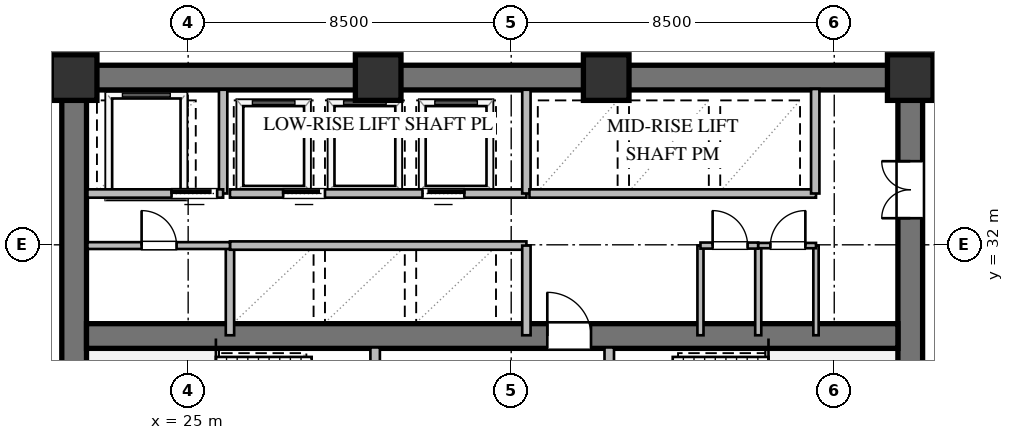
"""IFC4 building model, lengths in metres.
Left out: names, types, materials, properties, quantities, classifications, styles, units other than length and angle.
Written with IfcOpenShell. Run it as: python <this file> out.ifc"""

import sys

from ifc_helpers import new_model, si_unit, direction, frame, frame_2d, origin, origin_2d, place, context, subcontext, project, spatial, rectangle, extrude, element, fill, save


model = new_model("IFC4")
c1 = context("Model", 3, precision=1e-05, world=origin(), true_north=direction((0.0, 1.0)))
c2 = subcontext(c1, "Body", "Model", "MODEL_VIEW")
j1 = project(units=[si_unit("LENGTHUNIT", "METRE"), si_unit("PLANEANGLEUNIT", "RADIAN")], contexts=[c1])
p1 = place(None, origin())
s1 = spatial("IfcSite", under=j1, at=p1, CompositionType="ELEMENT")
p2 = place(p1, origin())
s2 = spatial("IfcBuilding", under=s1, at=p2, CompositionType="ELEMENT")
p3 = place(p2, frame((0.0, 0.0, 49.2)))
s3 = spatial("IfcBuildingStorey", under=s2, at=p3, CompositionType="ELEMENT", Elevation=49.2)
p4 = place(p3, frame((21.675, 36.4, 0.0), z_axis=(0.0, 0.0, 1.0), x_axis=(1.0, 0.0, 0.0)))
e1 = element("IfcWall", 1, at=p4, inside=s3, PredefinedType="SHEAR", context=c2, shape_type="SweptSolid", body=[
    extrude(rectangle(XDim=22.65, YDim=0.65, at=frame_2d((11.325, 0.0))), origin(), (0.0, 0.0, 1.0), 3.36),
])
p5 = place(p3, frame((22.0, 23.925, 0.0), z_axis=(0.0, 0.0, 1.0), x_axis=(0.0, 1.0, 0.0)))
e2 = element("IfcWall", 2, at=p5, inside=s3, PredefinedType="SHEAR", context=c2, shape_type="SweptSolid", body=[
    extrude(rectangle(XDim=12.15, YDim=0.65, at=frame_2d((6.075, 0.0))), origin(), (0.0, 0.0, 1.0), 3.36),
])
p6 = place(p3, frame((44.0, 23.925, 0.0), z_axis=(0.0, 0.0, 1.0), x_axis=(0.0, 1.0, 0.0)))
e3 = element("IfcWall", 3, at=p6, inside=s3, PredefinedType="SHEAR", context=c2, shape_type="SweptSolid", body=[
    extrude(rectangle(XDim=12.15, YDim=0.65, at=frame_2d((6.075, 0.0))), origin(), (0.0, 0.0, 1.0), 3.36),
])
p7 = place(p6, frame((8.775, 0.0, 0.0)))
e4 = element("IfcOpeningElement", 4, at=p7, cuts=e3, PredefinedType="OPENING", context=c2, shape_type="SweptSolid", body=[
    extrude(rectangle(XDim=1.5, YDim=2.15, at=frame_2d((0.75, 1.075))), frame((0.0, 0.335, 0.0), z_axis=(0.0, -1.0, 0.0), x_axis=(1.0, 0.0, 0.0)), (0.0, 0.0, 1.0), 0.67),
])
p8 = place(p3, frame((22.325, 29.6, 0.0), z_axis=(0.0, 0.0, 1.0), x_axis=(1.0, 0.0, 0.0)))
e5 = element("IfcWall", 5, at=p8, inside=s3, PredefinedType="SHEAR", context=c2, shape_type="SweptSolid", body=[
    extrude(rectangle(XDim=21.35, YDim=0.65, at=frame_2d((10.675, 0.0))), origin(), (0.0, 0.0, 1.0), 3.36),
])
p9 = place(p8, frame((12.125, 0.0, 0.0)))
e6 = element("IfcOpeningElement", 6, at=p9, cuts=e5, PredefinedType="OPENING", context=c2, shape_type="SweptSolid", body=[
    extrude(rectangle(XDim=1.15, YDim=2.1, at=frame_2d((0.575, 1.05))), frame((0.0, 0.335, 0.0), z_axis=(0.0, -1.0, 0.0), x_axis=(1.0, 0.0, 0.0)), (0.0, 0.0, 1.0), 0.67),
])
for number, where, z_axis, x_axis in (
    (7, (44.0, 36.4, 0.0), (0.0, 0.0, 1.0), (1.0, 0.0, 0.0)),
    (8, (36.0, 36.4, 0.0), (0.0, 0.0, 1.0), (1.0, 0.0, 0.0)),
    (9, (30.0, 36.4, 0.0), (0.0, 0.0, 1.0), (1.0, 0.0, 0.0)),
    (10, (22.0, 36.4, 0.0), (0.0, 0.0, 1.0), (1.0, 0.0, 0.0)),
):
    element("IfcColumn", number, at=place(p3, frame(where, z_axis=z_axis, x_axis=x_axis)), inside=s3, PredefinedType="COLUMN", context=c2, shape_type="SweptSolid", body=[
        extrude(rectangle(XDim=1.2, YDim=1.2, at=origin_2d()), origin(), (0.0, 0.0, 1.0), 3.6),
    ])
p10 = place(p3, frame((29.92, 23.9, 0.0), z_axis=(0.0, 0.0, 1.0), x_axis=(0.0, 1.0, 0.0)))
e11 = element("IfcWall", 11, at=p10, inside=s3, PredefinedType="SOLIDWALL", context=c2, shape_type="SweptSolid", body=[
    extrude(rectangle(XDim=5.4, YDim=0.25, at=frame_2d((2.7, 0.0))), origin(), (0.0, 0.0, 1.0), 3.36),
])
p11 = place(p10, frame((3.421, 0.0, 0.0)))
e12 = element("IfcOpeningElement", 12, at=p11, cuts=e11, PredefinedType="OPENING", context=c2, shape_type="SweptSolid", body=[
    extrude(rectangle(XDim=1.15, YDim=2.1, at=frame_2d((0.575, 1.05))), frame((0.0, 0.135, 0.0), z_axis=(0.0, -1.0, 0.0), x_axis=(1.0, 0.0, 0.0)), (0.0, 0.0, 1.0), 0.27),
])
p12 = place(p3, frame((36.08, 23.9, 0.0), z_axis=(0.0, 0.0, 1.0), x_axis=(0.0, 1.0, 0.0)))
e13 = element("IfcWall", 13, at=p12, inside=s3, PredefinedType="SOLIDWALL", context=c2, shape_type="SweptSolid", body=[
    extrude(rectangle(XDim=5.4, YDim=0.25, at=frame_2d((2.7, 0.0))), origin(), (0.0, 0.0, 1.0), 3.36),
])
p13 = place(p12, frame((3.421, 0.0, 0.0)))
e14 = element("IfcOpeningElement", 14, at=p13, cuts=e13, PredefinedType="OPENING", context=c2, shape_type="SweptSolid", body=[
    extrude(rectangle(XDim=1.15, YDim=2.1, at=frame_2d((0.575, 1.05))), frame((0.0, 0.135, 0.0), z_axis=(0.0, -1.0, 0.0), x_axis=(1.0, 0.0, 0.0)), (0.0, 0.0, 1.0), 0.27),
])
p14 = place(p3, frame((25.92, 33.35, 0.0), z_axis=(0.0, 0.0, 1.0), x_axis=(0.0, 1.0, 0.0)))
e15 = element("IfcWall", 15, at=p14, inside=s3, PredefinedType="SOLIDWALL", context=c2, shape_type="SweptSolid", body=[
    extrude(rectangle(XDim=2.73, YDim=0.22, at=frame_2d((1.365, 0.0))), origin(), (0.0, 0.0, 1.0), 3.36),
])
p15 = place(p3, frame((22.35, 33.35, 0.0), z_axis=(0.0, 0.0, 1.0), x_axis=(1.0, 0.0, 0.0)))
e16 = element("IfcWall", 16, at=p15, inside=s3, PredefinedType="SOLIDWALL", context=c2, shape_type="SweptSolid", body=[
    extrude(rectangle(XDim=3.57, YDim=0.22, at=frame_2d((1.785, 0.0))), origin(), (0.0, 0.0, 1.0), 3.36),
])
p16 = place(p15, frame((2.213, 0.0, 0.0)))
e17 = element("IfcOpeningElement", 17, at=p16, cuts=e16, PredefinedType="OPENING", context=c2, shape_type="SweptSolid", body=[
    extrude(rectangle(XDim=1.2, YDim=2.1, at=frame_2d((0.6, 1.05))), frame((0.0, 0.12, 0.0), z_axis=(0.0, -1.0, 0.0), x_axis=(1.0, 0.0, 0.0)), (0.0, 0.0, 1.0), 0.24),
])
p17 = place(p3, frame((26.1, 29.62, 0.0), z_axis=(0.0, 0.0, 1.0), x_axis=(0.0, 1.0, 0.0)))
e18 = element("IfcWall", 18, at=p17, inside=s3, PredefinedType="SOLIDWALL", context=c2, shape_type="SweptSolid", body=[
    extrude(rectangle(XDim=2.36, YDim=0.22, at=frame_2d((1.18, 0.0))), origin(), (0.0, 0.0, 1.0), 3.36),
])
p18 = place(p3, frame((26.1, 31.98, 0.0), z_axis=(0.0, 0.0, 1.0), x_axis=(1.0, 0.0, 0.0)))
e19 = element("IfcWall", 19, at=p18, inside=s3, PredefinedType="SOLIDWALL", context=c2, shape_type="SweptSolid", body=[
    extrude(rectangle(XDim=7.8, YDim=0.22, at=frame_2d((3.9, 0.0))), origin(), (0.0, 0.0, 1.0), 3.36),
])
p19 = place(p3, frame((33.9, 29.62, 0.0), z_axis=(0.0, 0.0, 1.0), x_axis=(0.0, 1.0, 0.0)))
e20 = element("IfcWall", 20, at=p19, inside=s3, PredefinedType="SOLIDWALL", context=c2, shape_type="SweptSolid", body=[
    extrude(rectangle(XDim=2.36, YDim=0.22, at=frame_2d((1.18, 0.0))), origin(), (0.0, 0.0, 1.0), 3.36),
])
p20 = place(p3, frame((26.1, 33.35, 0.0), z_axis=(0.0, 0.0, 1.0), x_axis=(1.0, 0.0, 0.0)))
e21 = element("IfcWall", 21, at=p20, inside=s3, PredefinedType="SOLIDWALL", context=c2, shape_type="SweptSolid", body=[
    extrude(rectangle(XDim=7.8, YDim=0.22, at=frame_2d((3.9, 0.0))), origin(), (0.0, 0.0, 1.0), 3.36),
])
p21 = place(p20, frame((1.4, 0.0, 0.0)))
e22 = element("IfcOpeningElement", 22, at=p21, cuts=e21, PredefinedType="OPENING", context=c2, shape_type="SweptSolid", body=[
    extrude(rectangle(XDim=1.1, YDim=2.1, at=frame_2d((0.55, 1.05))), frame((0.0, 0.12, 0.0), z_axis=(0.0, -1.0, 0.0), x_axis=(1.0, 0.0, 0.0)), (0.0, 0.0, 1.0), 0.24),
])
p22 = place(p20, frame((5.066, 0.0, 0.0)))
e23 = element("IfcOpeningElement", 23, at=p22, cuts=e21, PredefinedType="OPENING", context=c2, shape_type="SweptSolid", body=[
    extrude(rectangle(XDim=1.1, YDim=2.1, at=frame_2d((0.55, 1.05))), frame((0.0, 0.12, 0.0), z_axis=(0.0, -1.0, 0.0), x_axis=(1.0, 0.0, 0.0)), (0.0, 0.0, 1.0), 0.24),
])
p23 = place(p3, frame((33.9, 33.35, 0.0), z_axis=(0.0, 0.0, 1.0), x_axis=(0.0, 1.0, 0.0)))
e24 = element("IfcWall", 24, at=p23, inside=s3, PredefinedType="SOLIDWALL", context=c2, shape_type="SweptSolid", body=[
    extrude(rectangle(XDim=2.73, YDim=0.22, at=frame_2d((1.365, 0.0))), origin(), (0.0, 0.0, 1.0), 3.36),
])
p24 = place(p3, frame((33.98, 33.35, 0.0), z_axis=(0.0, 0.0, 1.0), x_axis=(1.0, 0.0, 0.0)))
e25 = element("IfcWall", 25, at=p24, inside=s3, PredefinedType="SOLIDWALL", context=c2, shape_type="SweptSolid", body=[
    extrude(rectangle(XDim=7.54, YDim=0.22, at=frame_2d((3.77, 0.0))), origin(), (0.0, 0.0, 1.0), 3.36),
])
p25 = place(p3, frame((41.5, 33.35, 0.0), z_axis=(0.0, 0.0, 1.0), x_axis=(0.0, 1.0, 0.0)))
e26 = element("IfcWall", 26, at=p25, inside=s3, PredefinedType="SOLIDWALL", context=c2, shape_type="SweptSolid", body=[
    extrude(rectangle(XDim=2.75, YDim=0.22, at=frame_2d((1.375, 0.0))), origin(), (0.0, 0.0, 1.0), 3.36),
])
p26 = place(p3, frame((22.35, 31.98, 0.0), z_axis=(0.0, 0.0, 1.0), x_axis=(1.0, 0.0, 0.0)))
e27 = element("IfcWall", 27, at=p26, inside=s3, PredefinedType="PARTITIONING", context=c2, shape_type="SweptSolid", body=[
    extrude(rectangle(XDim=3.75, YDim=0.18, at=frame_2d((1.875, 0.0))), origin(), (0.0, 0.0, 1.0), 3.36),
])
p27 = place(p26, frame((1.425, 0.0, 0.0)))
e28 = element("IfcOpeningElement", 28, at=p27, cuts=e27, PredefinedType="OPENING", context=c2, shape_type="SweptSolid", body=[
    extrude(rectangle(XDim=0.92, YDim=2.1, at=frame_2d((0.46, 1.05))), frame((0.0, 0.1, 0.0), z_axis=(0.0, -1.0, 0.0), x_axis=(1.0, 0.0, 0.0)), (0.0, 0.0, 1.0), 0.2),
])
for number, where, z_axis, x_axis in (
    (29, (38.48, 29.62, 0.0), (0.0, 0.0, 1.0), (0.0, 1.0, 0.0)),
    (30, (40.0, 29.62, 0.0), (0.0, 0.0, 1.0), (0.0, 1.0, 0.0)),
):
    element("IfcWall", number, at=place(p3, frame(where, z_axis=z_axis, x_axis=x_axis)), inside=s3, PredefinedType="PLUMBINGWALL", context=c2, shape_type="SweptSolid", body=[
        extrude(rectangle(XDim=2.36, YDim=0.16, at=frame_2d((1.18, 0.0))), origin(), (0.0, 0.0, 1.0), 3.36),
    ])
p28 = place(p3, frame((41.52, 29.62, 0.0), z_axis=(0.0, 0.0, 1.0), x_axis=(0.0, 1.0, 0.0)))
e31 = element("IfcWall", 31, at=p28, inside=s3, PredefinedType="PARTITIONING", context=c2, shape_type="SweptSolid", body=[
    extrude(rectangle(XDim=2.36, YDim=0.14, at=frame_2d((1.18, 0.0))), origin(), (0.0, 0.0, 1.0), 3.36),
])
p29 = place(p3, frame((38.48, 31.98, 0.0), z_axis=(0.0, 0.0, 1.0), x_axis=(1.0, 0.0, 0.0)))
e32 = element("IfcWall", 32, at=p29, inside=s3, PredefinedType="PLUMBINGWALL", context=c2, shape_type="SweptSolid", body=[
    extrude(rectangle(XDim=1.52, YDim=0.16, at=frame_2d((0.76, 0.0))), origin(), (0.0, 0.0, 1.0), 3.36),
])
p30 = place(p29, frame((0.32, 0.0, 0.0)))
e33 = element("IfcOpeningElement", 33, at=p30, cuts=e32, PredefinedType="OPENING", context=c2, shape_type="SweptSolid", body=[
    extrude(rectangle(XDim=0.92, YDim=2.1, at=frame_2d((0.46, 1.05))), frame((0.0, 0.09, 0.0), z_axis=(0.0, -1.0, 0.0), x_axis=(1.0, 0.0, 0.0)), (0.0, 0.0, 1.0), 0.18),
])
p31 = place(p3, frame((40.0, 31.98, 0.0), z_axis=(0.0, 0.0, 1.0), x_axis=(1.0, 0.0, 0.0)))
e34 = element("IfcWall", 34, at=p31, inside=s3, PredefinedType="PARTITIONING", context=c2, shape_type="SweptSolid", body=[
    extrude(rectangle(XDim=1.52, YDim=0.14, at=frame_2d((0.76, 0.0))), origin(), (0.0, 0.0, 1.0), 3.36),
])
p32 = place(p31, frame((0.32, 0.0, 0.0)))
e35 = element("IfcOpeningElement", 35, at=p32, cuts=e34, PredefinedType="OPENING", context=c2, shape_type="SweptSolid", body=[
    extrude(rectangle(XDim=0.92, YDim=2.1, at=frame_2d((0.46, 1.05))), frame((0.0, 0.08, 0.0), z_axis=(0.0, -1.0, 0.0), x_axis=(1.0, 0.0, 0.0)), (0.0, 0.0, 1.0), 0.16),
])
p33 = place(p9, origin())
e36 = element("IfcDoor", 36, at=p33, inside=s3, OperationType="SINGLE_SWING_LEFT", PredefinedType="DOOR", context=c2, shape_type="SweptSolid", body=[
    extrude(rectangle(XDim=1.15, YDim=2.1, at=frame_2d((0.575, 1.05))), frame((0.0, 0.025, 0.0), z_axis=(0.0, -1.0, 0.0), x_axis=(1.0, 0.0, 0.0)), (0.0, 0.0, 1.0), 0.05),
])
fill(e6, e36)
p34 = place(p7, origin())
e37 = element("IfcDoor", 37, at=p34, inside=s3, OperationType="DOUBLE_DOOR_SINGLE_SWING", PredefinedType="DOOR", context=c2, shape_type="SweptSolid", body=[
    extrude(rectangle(XDim=1.5, YDim=2.15, at=frame_2d((0.75, 1.075))), frame((0.0, 0.025, 0.0), z_axis=(0.0, -1.0, 0.0), x_axis=(1.0, 0.0, 0.0)), (0.0, 0.0, 1.0), 0.05),
])
fill(e4, e37)
p35 = place(p16, origin())
e38 = element("IfcDoor", 38, at=p35, inside=s3, OperationType="SLIDING_TO_LEFT", PredefinedType="DOOR", context=c2, shape_type="SweptSolid", body=[
    extrude(rectangle(XDim=1.2, YDim=2.1, at=frame_2d((0.6, 1.05))), frame((0.0, 0.025, 0.0), z_axis=(0.0, -1.0, 0.0), x_axis=(1.0, 0.0, 0.0)), (0.0, 0.0, 1.0), 0.05),
])
fill(e17, e38)
p36 = place(p21, origin())
e39 = element("IfcDoor", 39, at=p36, inside=s3, OperationType="SLIDING_TO_LEFT", PredefinedType="DOOR", context=c2, shape_type="SweptSolid", body=[
    extrude(rectangle(XDim=1.1, YDim=2.1, at=frame_2d((0.55, 1.05))), frame((0.0, 0.025, 0.0), z_axis=(0.0, -1.0, 0.0), x_axis=(1.0, 0.0, 0.0)), (0.0, 0.0, 1.0), 0.05),
])
fill(e22, e39)
p37 = place(p22, origin())
e40 = element("IfcDoor", 40, at=p37, inside=s3, OperationType="SLIDING_TO_RIGHT", PredefinedType="DOOR", context=c2, shape_type="SweptSolid", body=[
    extrude(rectangle(XDim=1.1, YDim=2.1, at=frame_2d((0.55, 1.05))), frame((0.0, 0.025, 0.0), z_axis=(0.0, -1.0, 0.0), x_axis=(1.0, 0.0, 0.0)), (0.0, 0.0, 1.0), 0.05),
])
fill(e23, e40)
p38 = place(p27, origin())
e41 = element("IfcDoor", 41, at=p38, inside=s3, OperationType="SINGLE_SWING_LEFT", PredefinedType="DOOR", context=c2, shape_type="SweptSolid", body=[
    extrude(rectangle(XDim=0.92, YDim=2.1, at=frame_2d((0.46, 1.05))), frame((0.0, 0.025, 0.0), z_axis=(0.0, -1.0, 0.0), x_axis=(1.0, 0.0, 0.0)), (0.0, 0.0, 1.0), 0.05),
])
fill(e28, e41)
p39 = place(p30, origin())
e42 = element("IfcDoor", 42, at=p39, inside=s3, OperationType="SINGLE_SWING_LEFT", PredefinedType="DOOR", context=c2, shape_type="SweptSolid", body=[
    extrude(rectangle(XDim=0.92, YDim=2.1, at=frame_2d((0.46, 1.05))), frame((0.0, 0.025, 0.0), z_axis=(0.0, -1.0, 0.0), x_axis=(1.0, 0.0, 0.0)), (0.0, 0.0, 1.0), 0.05),
])
fill(e33, e42)
p40 = place(p32, origin())
e43 = element("IfcDoor", 43, at=p40, inside=s3, OperationType="SINGLE_SWING_RIGHT", PredefinedType="DOOR", context=c2, shape_type="SweptSolid", body=[
    extrude(rectangle(XDim=0.92, YDim=2.1, at=frame_2d((0.46, 1.05))), frame((0.0, 0.025, 0.0), z_axis=(0.0, -1.0, 0.0), x_axis=(1.0, 0.0, 0.0)), (0.0, 0.0, 1.0), 0.05),
])
fill(e35, e43)
save(model, sys.argv[1])
